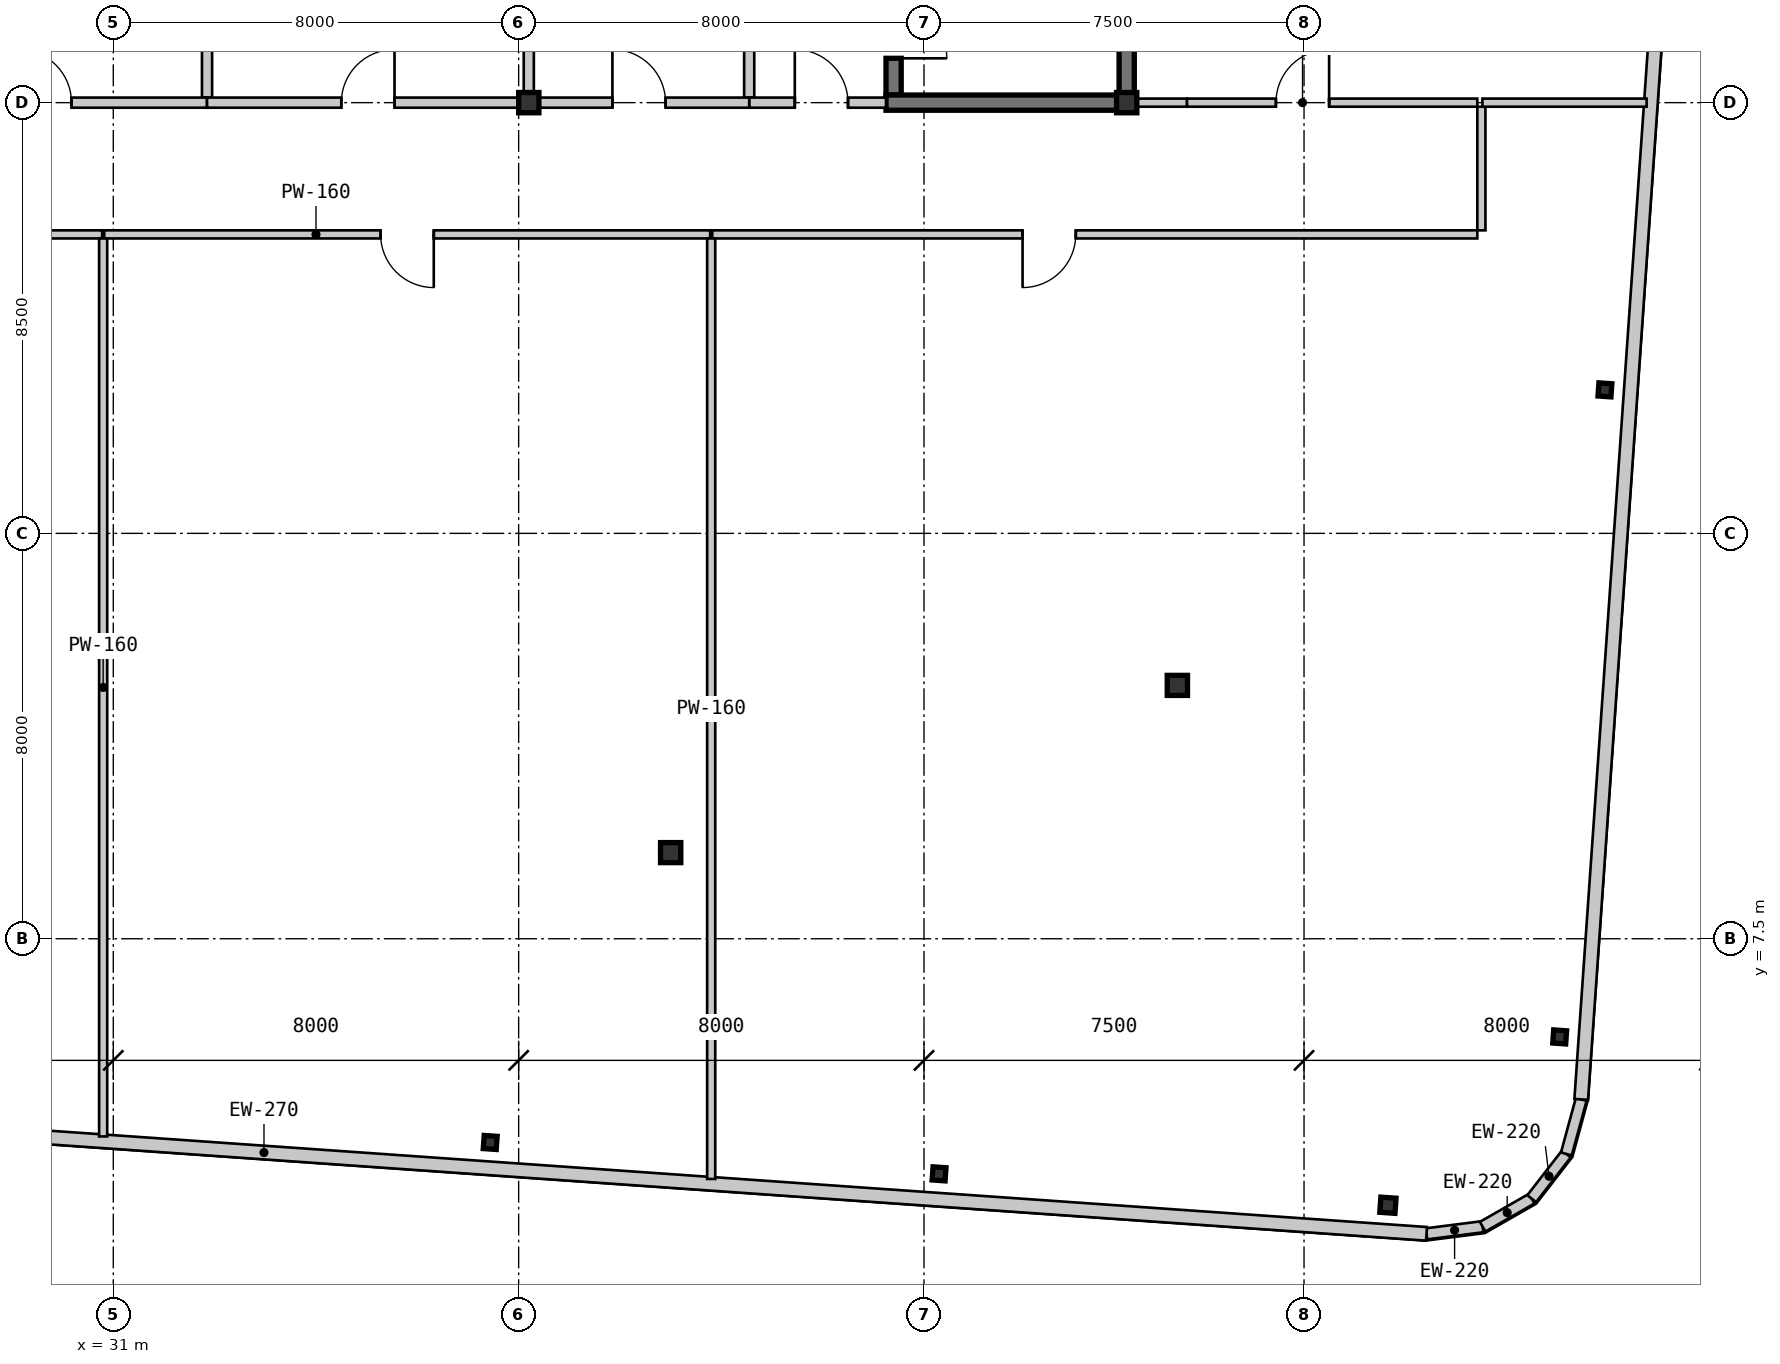
"""IFC4 building model, lengths in metres.
Left out: names, types, materials, properties, quantities, classifications, styles, units other than length and angle.
Written with IfcOpenShell. Run it as: python <this file> out.ifc"""

import sys

from ifc_helpers import new_model, si_unit, direction, frame, frame_2d, origin, origin_2d, place, context, subcontext, project, spatial, rectangle, hollow_rectangle, i_section, extrude, source, transform, mapped, element, fill, save


model = new_model("IFC4")
c1 = context("Model", 3, precision=1e-05, world=origin(), true_north=direction((0.0, 1.0)))
c2 = subcontext(c1, "Body", "Model", "MODEL_VIEW")
j1 = project(units=[si_unit("LENGTHUNIT", "METRE"), si_unit("PLANEANGLEUNIT", "RADIAN")], contexts=[c1])
p1 = place(None, origin())
s1 = spatial("IfcSite", under=j1, at=p1, CompositionType="ELEMENT")
p2 = place(p1, origin())
s2 = spatial("IfcBuilding", under=s1, at=p2, CompositionType="ELEMENT")
p3 = place(p2, frame((0.0, 0.0, 164.5)))
s3 = spatial("IfcBuildingStorey", under=s2, at=p3, CompositionType="ELEMENT", Elevation=164.5)
m1 = source(origin(), c2, "Body", "SweptSolid", [
    extrude(hollow_rectangle(XDim=0.4, YDim=0.4, WallThickness=0.016, at=origin_2d()), origin(), (0.0, 0.0, 1.0), 4.2),
])
for number, where, z_axis, x_axis in (
    (1, (39.2, 24.0, 0.0), (0.0, 0.0, 1.0), (1.0, 0.0, 0.0)),
    (2, (51.0, 24.0, 0.0), (0.0, 0.0, 1.0), (1.0, 0.0, 0.0)),
):
    element("IfcColumn", number, at=place(p3, frame(where, z_axis=z_axis, x_axis=x_axis)), inside=s3, PredefinedType="COLUMN", context=c2, shape_type="MappedRepresentation", body=[
        mapped(m1, transform((0.0, 0.0, 0.0), scale=1.0)),
    ])
m2 = source(origin(), c2, "Body", "SweptSolid", [
    extrude(i_section(OverallWidth=0.4, OverallDepth=0.396, WebThickness=0.022, FlangeThickness=0.034, at=origin_2d()), origin(), (0.0, 0.0, 1.0), 4.2),
])
for number, where, z_axis, x_axis in (
    (3, (42.0, 9.2, 0.0), (0.0, 0.0, 1.0), (1.0, 0.0, 0.0)),
    (4, (52.0, 12.5, 0.0), (0.0, 0.0, 1.0), (1.0, 0.0, 0.0)),
):
    element("IfcColumn", number, at=place(p3, frame(where, z_axis=z_axis, x_axis=x_axis)), inside=s3, PredefinedType="COLUMN", context=c2, shape_type="MappedRepresentation", body=[
        mapped(m2, transform((0.0, 0.0, 0.0), scale=1.0)),
    ])
m3 = source(origin(), c2, "Body", "SweptSolid", [
    extrude(i_section(OverallWidth=0.256, OverallDepth=0.26, WebThickness=0.01, FlangeThickness=0.017, at=origin_2d()), origin(), (0.0, 0.0, 1.0), 4.2),
])
for number, where, z_axis, x_axis in (
    (5, (38.439, 3.48, 0.0), (0.0, 0.0, 1.0), (0.998, -0.07, 0.0)),
    (6, (47.297, 2.861, 0.0), (0.0, 0.0, 1.0), (0.998, -0.07, 0.0)),
):
    element("IfcColumn", number, at=place(p3, frame(where, z_axis=z_axis, x_axis=x_axis)), inside=s3, PredefinedType="COLUMN", context=c2, shape_type="MappedRepresentation", body=[
        mapped(m3, transform((0.0, 0.0, 0.0), scale=1.0)),
    ])
m4 = source(origin(), c2, "Body", "SweptSolid", [
    extrude(hollow_rectangle(XDim=0.3, YDim=0.3, WallThickness=0.012, at=origin_2d()), origin(), (0.0, 0.0, 1.0), 4.2),
])
p4 = place(p3, frame((56.156, 2.241, 0.0), z_axis=(0.0, 0.0, 1.0), x_axis=(0.99756405026, -0.069756473744, 0.0)))
e7 = element("IfcColumn", 7, at=p4, inside=s3, PredefinedType="COLUMN", context=c2, shape_type="MappedRepresentation", body=[
    mapped(m4, transform((0.0, 0.0, 0.0), scale=1.0)),
])
for number, where, z_axis, x_axis in (
    (8, (59.545, 5.563, 0.0), (0.0, 0.0, 1.0), (0.998, -0.07, 0.0)),
    (9, (60.438, 18.332, 0.0), (0.0, 0.0, 1.0), (0.998, -0.07, 0.0)),
):
    element("IfcColumn", number, at=place(p3, frame(where, z_axis=z_axis, x_axis=x_axis)), inside=s3, PredefinedType="COLUMN", context=c2, shape_type="MappedRepresentation", body=[
        mapped(m3, transform((0.0, 0.0, 0.0), scale=1.0)),
    ])
m5 = source(origin(), c2, "Body", "SweptSolid", [
    extrude(rectangle(XDim=1.116, YDim=0.22, at=frame_2d((0.558, 0.0))), origin(), (0.0, 0.0, 1.0), 3.78),
])
p5 = place(p3, frame((56.918, 1.677, 0.0), z_axis=(0.0, 0.0, 1.0), x_axis=(0.99202678349, 0.126027222605, 0.0)))
e10 = element("IfcWall", 10, at=p5, inside=s3, PredefinedType="SOLIDWALL", context=c2, shape_type="MappedRepresentation", body=[
    mapped(m5, transform((0.0, 0.0, 0.0), scale=1.0)),
])
m6 = source(origin(), c2, "Body", "SweptSolid", [
    extrude(rectangle(XDim=1.116, YDim=0.22, at=frame_2d((0.558, 0.0))), origin(), (0.0, 0.0, 1.0), 3.78),
])
for number, where, z_axis, x_axis in (
    (11, (58.025, 1.817, 0.0), (0.0, 0.0, 1.0), (0.868, 0.496, 0.0)),
    (12, (58.994, 2.371, 0.0), (0.0, 0.0, 1.0), (0.612, 0.791, 0.0)),
    (13, (59.677, 3.254, 0.0), (0.0, 0.0, 1.0), (0.263, 0.965, 0.0)),
):
    element("IfcWall", number, at=place(p3, frame(where, z_axis=z_axis, x_axis=x_axis)), inside=s3, PredefinedType="SOLIDWALL", context=c2, shape_type="MappedRepresentation", body=[
        mapped(m6, transform((0.0, 0.0, 0.0), scale=1.0)),
    ])
m7 = source(origin(), c2, "Body", "SweptSolid", [
    extrude(rectangle(XDim=46.0, YDim=0.27, at=frame_2d((23.0, 0.0))), origin(), (0.0, 0.0, 1.0), 3.78),
])
p6 = place(p3, frame((11.03, 4.885, 0.0), z_axis=(0.0, 0.0, 1.0), x_axis=(0.997564136604, -0.06975523895, 0.0)))
e14 = element("IfcWall", 14, at=p6, inside=s3, PredefinedType="SOLIDWALL", context=c2, shape_type="MappedRepresentation", body=[
    mapped(m7, transform((0.0, 0.0, 0.0), scale=1.0)),
])
m8 = source(origin(), c2, "Body", "SweptSolid", [
    extrude(rectangle(XDim=28.0, YDim=0.27, at=frame_2d((14.0, 0.0))), origin(), (0.0, 0.0, 1.0), 3.78),
])
p7 = place(p3, frame((59.97, 4.33, 0.0), z_axis=(0.0, 0.0, 1.0), x_axis=(0.069754853754, 0.997564163539, 0.0)))
e15 = element("IfcWall", 15, at=p7, inside=s3, PredefinedType="SOLIDWALL", context=c2, shape_type="MappedRepresentation", body=[
    mapped(m8, transform((0.0, 0.0, 0.0), scale=1.0)),
])
m9 = source(origin(), c2, "Body", "SweptSolid", [
    extrude(rectangle(XDim=4.05, YDim=0.3, at=frame_2d((2.025, 0.0))), origin(), (0.0, 0.0, 1.0), 3.78),
])
p8 = place(p3, frame((51.0, 24.15, 0.0), z_axis=(0.0, 0.0, 1.0), x_axis=(0.0, 1.0, 0.0)))
e16 = element("IfcWall", 16, at=p8, inside=s3, PredefinedType="SHEAR", context=c2, shape_type="MappedRepresentation", body=[
    mapped(m9, transform((0.0, 0.0, 0.0), scale=1.0)),
])
m10 = source(origin(), c2, "Body", "SweptSolid", [
    extrude(rectangle(XDim=3.9, YDim=0.3, at=frame_2d((1.95, 0.0))), origin(), (0.0, 0.0, 1.0), 3.78),
])
p9 = place(p3, frame((46.4, 28.05, 0.0), z_axis=(0.0, 0.0, 1.0), x_axis=(0.0, -1.0, 0.0)))
e17 = element("IfcWall", 17, at=p9, inside=s3, PredefinedType="SHEAR", context=c2, shape_type="MappedRepresentation", body=[
    mapped(m10, transform((0.0, 0.0, 0.0), scale=1.0)),
])
m11 = source(origin(), c2, "Body", "SweptSolid", [
    extrude(rectangle(XDim=1.05, YDim=2.1, at=frame_2d((0.525, 1.05))), frame((0.0, 0.16, 0.0), z_axis=(0.0, -1.0, 0.0), x_axis=(1.0, 0.0, 0.0)), (0.0, 0.0, 1.0), 0.32),
])
p10 = place(p9, frame((2.125, 0.0, 0.0)))
e18 = element("IfcOpeningElement", 18, at=p10, cuts=e17, PredefinedType="OPENING", context=c2, shape_type="MappedRepresentation", body=[
    mapped(m11, transform((0.0, 0.0, 0.0), scale=1.0)),
])
m12 = source(origin(), c2, "Body", "SweptSolid", [
    extrude(rectangle(XDim=4.9, YDim=0.3, at=frame_2d((2.45, 0.0))), origin(), (0.0, 0.0, 1.0), 3.78),
])
p11 = place(p3, frame((46.25, 24.0, 0.0), z_axis=(0.0, 0.0, 1.0), x_axis=(1.0, 0.0, 0.0)))
e19 = element("IfcWall", 19, at=p11, inside=s3, PredefinedType="SHEAR", context=c2, shape_type="MappedRepresentation", body=[
    mapped(m12, transform((0.0, 0.0, 0.0), scale=1.0)),
])
m13 = source(origin(), c2, "Body", "SweptSolid", [
    extrude(rectangle(XDim=3.95, YDim=0.2, at=frame_2d((1.975, 0.0))), origin(), (0.0, 0.0, 1.0), 3.78),
])
p12 = place(p3, frame((43.55, 28.05, 0.0), z_axis=(0.0, 0.0, 1.0), x_axis=(0.0, -1.0, 0.0)))
e20 = element("IfcWall", 20, at=p12, inside=s3, PredefinedType="SOLIDWALL", context=c2, shape_type="MappedRepresentation", body=[
    mapped(m13, transform((0.0, 0.0, 0.0), scale=1.0)),
])
m14 = source(origin(), c2, "Body", "SweptSolid", [
    extrude(rectangle(XDim=2.7, YDim=0.2, at=frame_2d((1.35, 0.0))), origin(), (0.0, 0.0, 1.0), 3.247),
])
p13 = place(p3, frame((43.55, 24.0, 0.0), z_axis=(0.0, 0.0, 1.0), x_axis=(1.0, 0.0, 0.0)))
e21 = element("IfcWall", 21, at=p13, inside=s3, PredefinedType="SOLIDWALL", context=c2, shape_type="MappedRepresentation", body=[
    mapped(m14, transform((0.0, 0.0, 0.0), scale=1.0)),
])
m15 = source(origin(), c2, "Body", "SweptSolid", [
    extrude(rectangle(XDim=1.05, YDim=2.1, at=frame_2d((0.525, 1.05))), frame((0.0, 0.11, 0.0), z_axis=(0.0, -1.0, 0.0), x_axis=(1.0, 0.0, 0.0)), (0.0, 0.0, 1.0), 0.22),
])
p14 = place(p13, frame((0.9, 0.0, 0.0)))
e22 = element("IfcOpeningElement", 22, at=p14, cuts=e21, PredefinedType="OPENING", context=c2, shape_type="MappedRepresentation", body=[
    mapped(m15, transform((0.0, 0.0, 0.0), scale=1.0)),
])
m16 = source(origin(), c2, "Body", "SweptSolid", [
    extrude(rectangle(XDim=7.75, YDim=0.2, at=frame_2d((3.875, 0.0))), origin(), (0.0, 0.0, 1.0), 3.78),
])
p15 = place(p3, frame((32.85, 31.85, 0.0), z_axis=(0.0, 0.0, 1.0), x_axis=(0.0, -1.0, 0.0)))
e23 = element("IfcWall", 23, at=p15, inside=s3, PredefinedType="SOLIDWALL", context=c2, shape_type="MappedRepresentation", body=[
    mapped(m16, transform((0.0, 0.0, 0.0), scale=1.0)),
])
m17 = source(origin(), c2, "Body", "SweptSolid", [
    extrude(rectangle(XDim=6.4, YDim=0.2, at=frame_2d((3.2, 0.0))), origin(), (0.0, 0.0, 1.0), 3.32),
])
p16 = place(p3, frame((32.85, 24.0, 0.0), z_axis=(0.0, 0.0, 1.0), x_axis=(-1.0, 0.0, 0.0)))
e24 = element("IfcWall", 24, at=p16, inside=s3, PredefinedType="SOLIDWALL", context=c2, shape_type="MappedRepresentation", body=[
    mapped(m17, transform((0.0, 0.0, 0.0), scale=1.0)),
])
p17 = place(p16, frame((2.675, 0.0, 0.0)))
e25 = element("IfcOpeningElement", 25, at=p17, cuts=e24, PredefinedType="OPENING", context=c2, shape_type="MappedRepresentation", body=[
    mapped(m15, transform((0.0, 0.0, 0.0), scale=1.0)),
])
m18 = source(origin(), c2, "Body", "SweptSolid", [
    extrude(rectangle(XDim=3.95, YDim=0.2, at=frame_2d((1.975, 0.0))), origin(), (0.0, 0.0, 1.0), 3.32),
])
p18 = place(p3, frame((39.2, 28.05, 0.0), z_axis=(0.0, 0.0, 1.0), x_axis=(0.0, -1.0, 0.0)))
e26 = element("IfcWall", 26, at=p18, inside=s3, PredefinedType="SOLIDWALL", context=c2, shape_type="MappedRepresentation", body=[
    mapped(m18, transform((0.0, 0.0, 0.0), scale=1.0)),
])
m19 = source(origin(), c2, "Body", "SweptSolid", [
    extrude(rectangle(XDim=6.35, YDim=0.2, at=frame_2d((3.175, 0.0))), origin(), (0.0, 0.0, 1.0), 3.32),
])
p19 = place(p3, frame((39.2, 24.0, 0.0), z_axis=(0.0, 0.0, 1.0), x_axis=(-1.0, 0.0, 0.0)))
e27 = element("IfcWall", 27, at=p19, inside=s3, PredefinedType="SOLIDWALL", context=c2, shape_type="MappedRepresentation", body=[
    mapped(m19, transform((0.0, 0.0, 0.0), scale=1.0)),
])
p20 = place(p19, frame((2.65, 0.0, 0.0)))
e28 = element("IfcOpeningElement", 28, at=p20, cuts=e27, PredefinedType="OPENING", context=c2, shape_type="MappedRepresentation", body=[
    mapped(m15, transform((0.0, 0.0, 0.0), scale=1.0)),
])
m20 = source(origin(), c2, "Body", "SweptSolid", [
    extrude(rectangle(XDim=4.35, YDim=0.2, at=frame_2d((2.175, 0.0))), origin(), (0.0, 0.0, 1.0), 3.247),
])
p21 = place(p3, frame((43.55, 24.0, 0.0), z_axis=(0.0, 0.0, 1.0), x_axis=(-1.0, 0.0, 0.0)))
e29 = element("IfcWall", 29, at=p21, inside=s3, PredefinedType="SOLIDWALL", context=c2, shape_type="MappedRepresentation", body=[
    mapped(m20, transform((0.0, 0.0, 0.0), scale=1.0)),
])
p22 = place(p21, frame((1.65, 0.0, 0.0)))
e30 = element("IfcOpeningElement", 30, at=p22, cuts=e29, PredefinedType="OPENING", context=c2, shape_type="MappedRepresentation", body=[
    mapped(m15, transform((0.0, 0.0, 0.0), scale=1.0)),
])
m21 = source(origin(), c2, "Body", "SweptSolid", [
    extrude(rectangle(XDim=1.041, YDim=0.16, at=frame_2d((0.521, 0.0))), origin(), (0.0, 0.0, 1.0), 2.28),
])
p23 = place(p3, frame((51.15, 24.0, 0.0), z_axis=(0.0, 0.0, 1.0), x_axis=(1.0, 0.0, 0.0)))
e31 = element("IfcWall", 31, at=p23, inside=s3, PredefinedType="PARTITIONING", context=c2, shape_type="MappedRepresentation", body=[
    mapped(m21, transform((0.0, 0.0, 0.0), scale=1.0)),
])
m22 = source(origin(), c2, "Body", "SweptSolid", [
    extrude(rectangle(XDim=5.729, YDim=0.16, at=frame_2d((2.865, 0.0))), origin(), (0.0, 0.0, 1.0), 3.78),
])
p24 = place(p3, frame((52.191, 24.0, 0.0), z_axis=(0.0, 0.0, 1.0), x_axis=(1.0, 0.0, 0.0)))
e32 = element("IfcWall", 32, at=p24, inside=s3, PredefinedType="PARTITIONING", context=c2, shape_type="MappedRepresentation", body=[
    mapped(m22, transform((0.0, 0.0, 0.0), scale=1.0)),
])
m23 = source(origin(), c2, "Body", "SweptSolid", [
    extrude(rectangle(XDim=1.05, YDim=2.1, at=frame_2d((0.525, 1.05))), frame((0.0, 0.09, 0.0), z_axis=(0.0, -1.0, 0.0), x_axis=(1.0, 0.0, 0.0)), (0.0, 0.0, 1.0), 0.18),
])
p25 = place(p24, frame((1.754, 0.0, 0.0)))
e33 = element("IfcOpeningElement", 33, at=p25, cuts=e32, PredefinedType="OPENING", context=c2, shape_type="MappedRepresentation", body=[
    mapped(m23, transform((0.0, 0.0, 0.0), scale=1.0)),
])
m24 = source(origin(), c2, "Body", "SweptSolid", [
    extrude(rectangle(XDim=11.959, YDim=0.16, at=frame_2d((5.98, 0.0))), origin(), (0.0, 0.0, 1.0), 3.78),
])
p26 = place(p3, frame((30.78, 21.4, 0.0), z_axis=(0.0, 0.0, 1.0), x_axis=(-1.0, 0.0, 0.0)))
e34 = element("IfcWall", 34, at=p26, inside=s3, PredefinedType="PARTITIONING", context=c2, shape_type="MappedRepresentation", body=[
    mapped(m24, transform((0.0, 0.0, 0.0), scale=1.0)),
])
p27 = place(p26, frame((5.455, 0.0, 0.0)))
e35 = element("IfcOpeningElement", 35, at=p27, cuts=e34, PredefinedType="OPENING", context=c2, shape_type="MappedRepresentation", body=[
    mapped(m23, transform((0.0, 0.0, 0.0), scale=1.0)),
])
p28 = place(p3, frame((42.78, 21.4, 0.0), z_axis=(0.0, 0.0, 1.0), x_axis=(-1.0, 0.0, 0.0)))
e36 = element("IfcWall", 36, at=p28, inside=s3, PredefinedType="PARTITIONING", context=c2, shape_type="MappedRepresentation", body=[
    mapped(m24, transform((0.0, 0.0, 0.0), scale=1.0)),
])
p29 = place(p28, frame((5.455, 0.0, 0.0)))
e37 = element("IfcOpeningElement", 37, at=p29, cuts=e36, PredefinedType="OPENING", context=c2, shape_type="MappedRepresentation", body=[
    mapped(m23, transform((0.0, 0.0, 0.0), scale=1.0)),
])
m25 = source(origin(), c2, "Body", "SweptSolid", [
    extrude(rectangle(XDim=15.1, YDim=0.16, at=frame_2d((7.55, 0.0))), origin(), (0.0, 0.0, 1.0), 3.78),
])
p30 = place(p3, frame((57.92, 21.4, 0.0), z_axis=(0.0, 0.0, 1.0), x_axis=(-1.0, 0.0, 0.0)))
e38 = element("IfcWall", 38, at=p30, inside=s3, PredefinedType="PARTITIONING", context=c2, shape_type="MappedRepresentation", body=[
    mapped(m25, transform((0.0, 0.0, 0.0), scale=1.0)),
])
p31 = place(p30, frame((7.925, 0.0, 0.0)))
e39 = element("IfcOpeningElement", 39, at=p31, cuts=e38, PredefinedType="OPENING", context=c2, shape_type="MappedRepresentation", body=[
    mapped(m23, transform((0.0, 0.0, 0.0), scale=1.0)),
])
m26 = source(origin(), c2, "Body", "SweptSolid", [
    extrude(rectangle(XDim=2.44, YDim=0.16, at=frame_2d((1.22, 0.0))), origin(), (0.0, 0.0, 1.0), 3.78),
])
p32 = place(p3, frame((58.0, 23.92, 0.0), z_axis=(0.0, 0.0, 1.0), x_axis=(0.0, -1.0, 0.0)))
e40 = element("IfcWall", 40, at=p32, inside=s3, PredefinedType="PARTITIONING", context=c2, shape_type="MappedRepresentation", body=[
    mapped(m26, transform((0.0, 0.0, 0.0), scale=1.0)),
])
m27 = source(origin(), c2, "Body", "SweptSolid", [
    extrude(rectangle(XDim=3.241, YDim=0.16, at=frame_2d((1.621, 0.0))), origin(), (0.0, 0.0, 1.0), 3.78),
])
p33 = place(p3, frame((61.261, 24.0, 0.0), z_axis=(0.0, 0.0, 1.0), x_axis=(-1.0, 0.0, 0.0)))
e41 = element("IfcWall", 41, at=p33, inside=s3, PredefinedType="PARTITIONING", context=c2, shape_type="MappedRepresentation", body=[
    mapped(m27, transform((0.0, 0.0, 0.0), scale=1.0)),
])
m28 = source(origin(), c2, "Body", "SweptSolid", [
    extrude(rectangle(XDim=17.721, YDim=0.16, at=frame_2d((8.861, 0.0))), origin(), (0.0, 0.0, 1.0), 3.78),
])
p34 = place(p3, frame((30.8, 21.32, 0.0), z_axis=(0.0, 0.0, 1.0), x_axis=(0.0, -1.0, 0.0)))
e42 = element("IfcWall", 42, at=p34, inside=s3, PredefinedType="PARTITIONING", context=c2, shape_type="MappedRepresentation", body=[
    mapped(m28, transform((0.0, 0.0, 0.0), scale=1.0)),
])
m29 = source(origin(), c2, "Body", "SweptSolid", [
    extrude(rectangle(XDim=18.56, YDim=0.16, at=frame_2d((9.28, 0.0))), origin(), (0.0, 0.0, 1.0), 3.78),
])
p35 = place(p3, frame((42.8, 21.32, 0.0), z_axis=(0.0, 0.0, 1.0), x_axis=(0.0, -1.0, 0.0)))
e43 = element("IfcWall", 43, at=p35, inside=s3, PredefinedType="PARTITIONING", context=c2, shape_type="MappedRepresentation", body=[
    mapped(m29, transform((0.0, 0.0, 0.0), scale=1.0)),
])
m30 = source(origin(), c2, "Body", "SweptSolid", [
    extrude(rectangle(XDim=1.05, YDim=2.1, at=frame_2d((0.525, 1.05))), frame((0.0, 0.025, 0.0), z_axis=(0.0, -1.0, 0.0), x_axis=(1.0, 0.0, 0.0)), (0.0, 0.0, 1.0), 0.05),
])
p36 = place(p10, origin())
e44 = element("IfcDoor", 44, at=p36, inside=s3, OperationType="SINGLE_SWING_RIGHT", PredefinedType="DOOR", context=c2, shape_type="MappedRepresentation", body=[
    mapped(m30, transform((0.0, 0.0, 0.0), scale=1.0)),
])
fill(e18, e44)
p37 = place(p14, origin())
e45 = element("IfcDoor", 45, at=p37, inside=s3, OperationType="SINGLE_SWING_LEFT", PredefinedType="DOOR", context=c2, shape_type="MappedRepresentation", body=[
    mapped(m30, transform((0.0, 0.0, 0.0), scale=1.0)),
])
fill(e22, e45)
p38 = place(p17, frame((1.05, 0.0, 0.0), z_axis=(0.0, 0.0, 1.0), x_axis=(-1.0, 0.0, 0.0)))
e46 = element("IfcDoor", 46, at=p38, inside=s3, OperationType="SINGLE_SWING_LEFT", PredefinedType="DOOR", context=c2, shape_type="MappedRepresentation", body=[
    mapped(m30, transform((0.0, 0.0, 0.0), scale=1.0)),
])
fill(e25, e46)
p39 = place(p20, frame((1.05, 0.0, 0.0), z_axis=(0.0, 0.0, 1.0), x_axis=(-1.0, 0.0, 0.0)))
e47 = element("IfcDoor", 47, at=p39, inside=s3, OperationType="SINGLE_SWING_RIGHT", PredefinedType="DOOR", context=c2, shape_type="MappedRepresentation", body=[
    mapped(m30, transform((0.0, 0.0, 0.0), scale=1.0)),
])
fill(e28, e47)
p40 = place(p22, frame((1.05, 0.0, 0.0), z_axis=(0.0, 0.0, 1.0), x_axis=(-1.0, 0.0, 0.0)))
e48 = element("IfcDoor", 48, at=p40, inside=s3, OperationType="SINGLE_SWING_LEFT", PredefinedType="DOOR", context=c2, shape_type="MappedRepresentation", body=[
    mapped(m30, transform((0.0, 0.0, 0.0), scale=1.0)),
])
fill(e30, e48)
p41 = place(p25, origin())
e49 = element("IfcDoor", 49, at=p41, inside=s3, OperationType="SINGLE_SWING_RIGHT", PredefinedType="DOOR", context=c2, shape_type="MappedRepresentation", body=[
    mapped(m30, transform((0.0, 0.0, 0.0), scale=1.0)),
])
fill(e33, e49)
p42 = place(p29, origin())
e50 = element("IfcDoor", 50, at=p42, inside=s3, OperationType="SINGLE_SWING_LEFT", PredefinedType="DOOR", context=c2, shape_type="MappedRepresentation", body=[
    mapped(m30, transform((0.0, 0.0, 0.0), scale=1.0)),
])
fill(e37, e50)
p43 = place(p31, origin())
e51 = element("IfcDoor", 51, at=p43, inside=s3, OperationType="SINGLE_SWING_RIGHT", PredefinedType="DOOR", context=c2, shape_type="MappedRepresentation", body=[
    mapped(m30, transform((0.0, 0.0, 0.0), scale=1.0)),
])
fill(e39, e51)
save(model, sys.argv[1])
